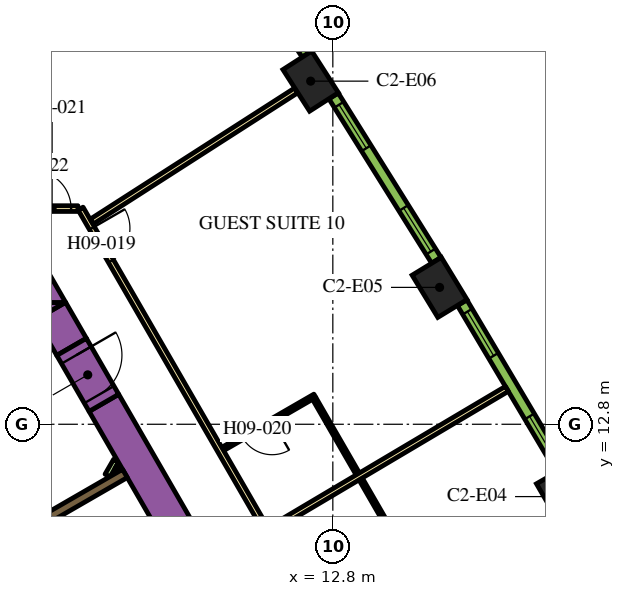
"""IFC4 building model, lengths in metres.
Left out: names, types, materials, properties, quantities, classifications, styles, units other than length and angle.
Written with IfcOpenShell. Run it as: python <this file> out.ifc"""

import sys

from ifc_helpers import new_model, si_unit, direction, frame, frame_2d, origin, origin_2d, place, context, subcontext, project, spatial, polyline, rectangle, outline, extrude, element, fill, save


model = new_model("IFC4")
c1 = context("Model", 3, precision=1e-05, world=origin(), true_north=direction((0.0, 1.0)))
c2 = subcontext(c1, "Body", "Model", "MODEL_VIEW")
j1 = project(units=[si_unit("LENGTHUNIT", "METRE"), si_unit("PLANEANGLEUNIT", "RADIAN")], contexts=[c1])
p1 = place(None, origin())
s1 = spatial("IfcSite", under=j1, at=p1, CompositionType="ELEMENT")
p2 = place(p1, origin())
s2 = spatial("IfcBuilding", under=s1, at=p2, CompositionType="ELEMENT")
p3 = place(p2, frame((0.0, 0.0, 126.6)))
s3 = spatial("IfcBuildingStorey", under=s2, at=p3, CompositionType="ELEMENT", Elevation=126.6)
for number, where, z_axis, x_axis in (
    (1, (18.874, 10.897, 0.0), (0.0, 0.0, 1.0), (-0.5, 0.866, 0.0)),
    (2, (15.609, 16.402, 0.0), (0.0, 0.0, 1.0), (-0.52, 0.854, 0.0)),
    (3, (12.217, 21.828, 0.0), (0.0, 0.0, 1.0), (-0.54, 0.842, 0.0)),
):
    element("IfcColumn", number, at=place(p3, frame(where, z_axis=z_axis, x_axis=x_axis)), inside=s3, PredefinedType="COLUMN", context=c2, shape_type="SweptSolid", body=[
        extrude(rectangle(XDim=1.3, YDim=0.9, at=origin_2d()), origin(), (0.0, 0.0, 1.0), 3.9),
    ])
p4 = place(p3, frame((6.776, 13.364, 0.0), z_axis=(0.0, 0.0, 1.0), x_axis=(0.500004177138, -0.8660229921, 0.0)))
e4 = element("IfcWall", 4, at=p4, inside=s3, PredefinedType="SOLIDWALL", context=c2, shape_type="SweptSolid", body=[
    extrude(rectangle(XDim=20.204, YDim=0.9, at=frame_2d((10.102, 0.0))), origin(), (0.0, 0.0, 1.0), 3.9),
])
p5 = place(p3, origin())
e5 = element("IfcWall", 5, at=p5, inside=s3, PredefinedType="SOLIDWALL", context=c2, shape_type="SweptSolid", body=[
    extrude(outline(polyline([(5.265, 16.0), (5.265, 16.88), (5.773, 16.0), (5.265, 16.0)])), origin(), (0.0, 0.0, 1.0), 3.9),
])
p6 = place(p3, frame((5.926, 14.836, 0.0), z_axis=(0.0, 0.0, 1.0), x_axis=(-0.500076735116, 0.865981096212, 0.0)))
e6 = element("IfcWall", 6, at=p6, inside=s3, PredefinedType="SOLIDWALL", context=c2, shape_type="SweptSolid", body=[
    extrude(rectangle(XDim=1.094, YDim=0.9, at=frame_2d((0.547, 0.0))), origin(), (0.0, 0.0, 1.0), 3.9),
])
e7 = element("IfcWall", 7, at=p5, inside=s3, PredefinedType="SOLIDWALL", context=c2, shape_type="SweptSolid", body=[
    extrude(outline(polyline([(4.734, 16.0), (5.75, 16.0), (4.988, 15.56), (4.734, 16.0)])), origin(), (0.0, 0.0, 1.0), 3.9),
])
p7 = place(p3, frame((5.356, 10.367, 0.0), z_axis=(0.0, 0.0, 1.0), x_axis=(0.865978535641, 0.50008116922, 0.0)))
e8 = element("IfcWall", 8, at=p7, inside=s3, PredefinedType="SOLIDWALL", context=c2, shape_type="SweptSolid", body=[
    extrude(rectangle(XDim=2.278, YDim=0.25, at=frame_2d((1.139, 0.0))), origin(), (0.0, 0.0, 1.0), 3.9),
])
p8 = place(p3, frame((6.872, 11.45, 0.0), z_axis=(0.0, 0.0, 1.0), x_axis=(0.499846793097, 0.866113839764, 0.0)))
e9 = element("IfcWall", 9, at=p8, inside=s3, PredefinedType="PARTITIONING", context=c2, shape_type="SweptSolid", body=[
    extrude(rectangle(XDim=0.453, YDim=0.15, at=frame_2d((0.227, 0.0))), origin(), (0.0, 0.0, 1.0), 2.75),
])
p9 = place(p3, frame((7.131, 11.6, 0.0), z_axis=(0.0, 0.0, 1.0), x_axis=(0.498600033135, 0.866832167699, 0.0)))
e10 = element("IfcWall", 10, at=p9, inside=s3, PredefinedType="PARTITIONING", context=c2, shape_type="SweptSolid", body=[
    extrude(rectangle(XDim=0.107, YDim=0.15, at=frame_2d((0.053, 0.0))), origin(), (0.0, 0.0, 1.0), 2.75),
])
p10 = place(p3, frame((5.926, 14.836, 0.0), z_axis=(0.0, 0.0, 1.0), x_axis=(0.500062241894, -0.865989465428, 0.0)))
e11 = element("IfcWall", 11, at=p10, inside=s3, PredefinedType="SOLIDWALL", context=c2, shape_type="SweptSolid", body=[
    extrude(rectangle(XDim=1.7, YDim=0.9, at=frame_2d((0.85, 0.0))), origin(), (0.0, 0.0, 1.0), 3.9),
])
p11 = place(p10, frame((0.25, 0.0, 0.0)))
e12 = element("IfcOpeningElement", 12, at=p11, cuts=e11, PredefinedType="OPENING", context=c2, shape_type="SweptSolid", body=[
    extrude(rectangle(XDim=1.2, YDim=2.1, at=frame_2d((0.6, 1.05))), frame((0.0, 0.46, 0.0), z_axis=(0.0, -1.0, 0.0), x_axis=(1.0, 0.0, 0.0)), (0.0, 0.0, 1.0), 0.92),
])
p12 = place(p3, frame((6.163, 18.475, 0.0), z_axis=(0.0, 0.0, 1.0), x_axis=(0.500001317485, -0.866024643133, 0.0)))
e13 = element("IfcWall", 13, at=p12, inside=s3, PredefinedType="PARTITIONING", context=c2, shape_type="SweptSolid", body=[
    extrude(rectangle(XDim=25.767, YDim=0.15, at=frame_2d((12.883, 0.0))), origin(), (0.0, 0.0, 1.0), 2.75),
])
p13 = place(p12, frame((19.306, 0.0, 0.0)))
e14 = element("IfcOpeningElement", 14, at=p13, cuts=e13, PredefinedType="OPENING", context=c2, shape_type="SweptSolid", body=[
    extrude(rectangle(XDim=1.0, YDim=2.1, at=frame_2d((0.5, 1.05))), frame((0.0, 0.085, 0.0), z_axis=(0.0, -1.0, 0.0), x_axis=(1.0, 0.0, 0.0)), (0.0, 0.0, 1.0), 0.17),
])
p14 = place(p12, frame((17.999, 0.0, 0.0)))
e15 = element("IfcOpeningElement", 15, at=p14, cuts=e13, PredefinedType="OPENING", context=c2, shape_type="SweptSolid", body=[
    extrude(rectangle(XDim=1.0, YDim=2.1, at=frame_2d((0.5, 1.05))), frame((0.0, 0.085, 0.0), z_axis=(0.0, -1.0, 0.0), x_axis=(1.0, 0.0, 0.0)), (0.0, 0.0, 1.0), 0.17),
])
p15 = place(p12, frame((0.596, 0.0, 0.0)))
e16 = element("IfcOpeningElement", 16, at=p15, cuts=e13, PredefinedType="OPENING", context=c2, shape_type="SweptSolid", body=[
    extrude(rectangle(XDim=1.0, YDim=2.1, at=frame_2d((0.5, 1.05))), frame((0.0, 0.085, 0.0), z_axis=(0.0, -1.0, 0.0), x_axis=(1.0, 0.0, 0.0)), (0.0, 0.0, 1.0), 0.17),
])
p16 = place(p3, frame((0.825, 18.475, 0.0), z_axis=(0.0, 0.0, 1.0), x_axis=(1.0, 0.0, 0.0)))
e17 = element("IfcWall", 17, at=p16, inside=s3, PredefinedType="PARTITIONING", context=c2, shape_type="SweptSolid", body=[
    extrude(rectangle(XDim=5.268, YDim=0.15, at=frame_2d((2.634, 0.0))), origin(), (0.0, 0.0, 1.0), 2.75),
])
p17 = place(p16, frame((4.088, 0.0, 0.0)))
e18 = element("IfcOpeningElement", 18, at=p17, cuts=e17, PredefinedType="OPENING", context=c2, shape_type="SweptSolid", body=[
    extrude(rectangle(XDim=1.0, YDim=2.1, at=frame_2d((0.5, 1.05))), frame((0.0, 0.085, 0.0), z_axis=(0.0, -1.0, 0.0), x_axis=(1.0, 0.0, 0.0)), (0.0, 0.0, 1.0), 0.17),
])
p18 = place(p3, frame((8.326, 26.923, 0.0), z_axis=(0.0, 0.0, 1.0), x_axis=(-0.828836601893, -0.5594907393, 0.0)))
e19 = element("IfcWall", 19, at=p18, inside=s3, PredefinedType="PARTITIONING", context=c2, shape_type="SweptSolid", body=[
    extrude(rectangle(XDim=8.909, YDim=0.15, at=frame_2d((4.455, 0.0))), origin(), (0.0, 0.0, 1.0), 2.75),
])
p19 = place(p3, frame((11.838, 21.585, 0.0), z_axis=(0.0, 0.0, 1.0), x_axis=(-0.841699322813, -0.539946525108, 0.0)))
e20 = element("IfcWall", 20, at=p19, inside=s3, PredefinedType="PARTITIONING", context=c2, shape_type="SweptSolid", body=[
    extrude(rectangle(XDim=6.392, YDim=0.15, at=frame_2d((3.196, 0.0))), origin(), (0.0, 0.0, 1.0), 2.75),
])
p20 = place(p3, frame((17.379, 13.731, 0.0), z_axis=(0.0, 0.0, 1.0), x_axis=(-0.860132461691, -0.510070728768, 0.0)))
e21 = element("IfcWall", 21, at=p20, inside=s3, PredefinedType="PARTITIONING", context=c2, shape_type="SweptSolid", body=[
    extrude(rectangle(XDim=7.257, YDim=0.15, at=frame_2d((3.628, 0.0))), origin(), (0.0, 0.0, 1.0), 2.75),
])
p21 = place(p3, frame((14.712, 9.318, 0.0), z_axis=(0.0, 0.0, 1.0), x_axis=(-0.50000006957, 0.866025363618, 0.0)))
e22 = element("IfcWall", 22, at=p21, inside=s3, PredefinedType="PARTITIONING", context=c2, shape_type="SweptSolid", body=[
    extrude(rectangle(XDim=2.36, YDim=0.1, at=frame_2d((1.18, 0.0))), origin(), (0.0, 0.0, 1.0), 2.75),
])
p22 = place(p3, frame((12.327, 13.549, 0.0), z_axis=(0.0, 0.0, 1.0), x_axis=(-0.866056369097, -0.49994636267, 0.0)))
e23 = element("IfcWall", 23, at=p22, inside=s3, PredefinedType="PARTITIONING", context=c2, shape_type="SweptSolid", body=[
    extrude(rectangle(XDim=2.8, YDim=0.1, at=frame_2d((1.4, 0.0))), origin(), (0.0, 0.0, 1.0), 2.75),
])
p23 = place(p22, frame((1.3, 0.0, 0.0)))
e24 = element("IfcOpeningElement", 24, at=p23, cuts=e23, PredefinedType="OPENING", context=c2, shape_type="SweptSolid", body=[
    extrude(rectangle(XDim=0.9, YDim=2.1, at=frame_2d((0.45, 1.05))), frame((0.0, 0.06, 0.0), z_axis=(0.0, -1.0, 0.0), x_axis=(1.0, 0.0, 0.0)), (0.0, 0.0, 1.0), 0.12),
])
p24 = place(p3, frame((12.309, 13.481, 0.0), z_axis=(0.0, 0.0, 1.0), x_axis=(0.499968531483, -0.866043571379, 0.0)))
e25 = element("IfcWall", 25, at=p24, inside=s3, PredefinedType="PARTITIONING", context=c2, shape_type="SweptSolid", body=[
    extrude(rectangle(XDim=2.29, YDim=0.1, at=frame_2d((1.145, 0.0))), origin(), (0.0, 0.0, 1.0), 2.75),
])
p25 = place(p3, frame((18.805, 11.611, 0.0), z_axis=(0.0, 0.0, 1.0), x_axis=(-0.510054281659, 0.860142214847, 0.0)))
e26 = element("IfcWall", 26, at=p25, inside=s3, PredefinedType="SOLIDWALL", context=c2, shape_type="SweptSolid", body=[
    extrude(rectangle(XDim=5.101, YDim=0.29, at=frame_2d((2.55, 0.0))), origin(), (0.0, 0.0, 1.0), 3.65),
])
p26 = place(p25, frame((0.273, 0.0, 0.9)))
e27 = element("IfcOpeningElement", 27, at=p26, cuts=e26, PredefinedType="OPENING", context=c2, shape_type="SweptSolid", body=[
    extrude(rectangle(XDim=1.35, YDim=2.15, at=frame_2d((0.675, 1.075))), frame((0.0, 0.155, 0.0), z_axis=(0.0, -1.0, 0.0), x_axis=(1.0, 0.0, 0.0)), (0.0, 0.0, 1.0), 0.31),
])
p27 = place(p25, frame((3.478, 0.0, 0.9)))
e28 = element("IfcOpeningElement", 28, at=p27, cuts=e26, PredefinedType="OPENING", context=c2, shape_type="SweptSolid", body=[
    extrude(rectangle(XDim=1.35, YDim=2.15, at=frame_2d((0.675, 1.075))), frame((0.0, 0.155, 0.0), z_axis=(0.0, -1.0, 0.0), x_axis=(1.0, 0.0, 0.0)), (0.0, 0.0, 1.0), 0.31),
])
p28 = place(p3, frame((15.524, 17.114, 0.0), z_axis=(0.0, 0.0, 1.0), x_axis=(-0.530072082134, 0.847952585787, 0.0)))
e29 = element("IfcWall", 29, at=p28, inside=s3, PredefinedType="SOLIDWALL", context=c2, shape_type="SweptSolid", body=[
    extrude(rectangle(XDim=5.1, YDim=0.29, at=frame_2d((2.55, 0.0))), origin(), (0.0, 0.0, 1.0), 3.65),
])
p29 = place(p28, frame((0.273, 0.0, 0.9)))
e30 = element("IfcOpeningElement", 30, at=p29, cuts=e29, PredefinedType="OPENING", context=c2, shape_type="SweptSolid", body=[
    extrude(rectangle(XDim=1.35, YDim=2.15, at=frame_2d((0.675, 1.075))), frame((0.0, 0.155, 0.0), z_axis=(0.0, -1.0, 0.0), x_axis=(1.0, 0.0, 0.0)), (0.0, 0.0, 1.0), 0.31),
])
p30 = place(p28, frame((3.478, 0.0, 0.9)))
e31 = element("IfcOpeningElement", 31, at=p30, cuts=e29, PredefinedType="OPENING", context=c2, shape_type="SweptSolid", body=[
    extrude(rectangle(XDim=1.35, YDim=2.15, at=frame_2d((0.675, 1.075))), frame((0.0, 0.155, 0.0), z_axis=(0.0, -1.0, 0.0), x_axis=(1.0, 0.0, 0.0)), (0.0, 0.0, 1.0), 0.31),
])
p31 = place(p3, frame((12.115, 22.539, 0.0), z_axis=(0.0, 0.0, 1.0), x_axis=(-0.549741341923, 0.835334937005, 0.0)))
e32 = element("IfcWall", 32, at=p31, inside=s3, PredefinedType="SOLIDWALL", context=c2, shape_type="SweptSolid", body=[
    extrude(rectangle(XDim=5.1, YDim=0.29, at=frame_2d((2.55, 0.0))), origin(), (0.0, 0.0, 1.0), 3.65),
])
p32 = place(p31, frame((0.273, 0.0, 0.9)))
e33 = element("IfcOpeningElement", 33, at=p32, cuts=e32, PredefinedType="OPENING", context=c2, shape_type="SweptSolid", body=[
    extrude(rectangle(XDim=1.35, YDim=2.15, at=frame_2d((0.675, 1.075))), frame((0.0, 0.155, 0.0), z_axis=(0.0, -1.0, 0.0), x_axis=(1.0, 0.0, 0.0)), (0.0, 0.0, 1.0), 0.31),
])
p33 = place(p31, frame((3.478, 0.0, 0.9)))
e34 = element("IfcOpeningElement", 34, at=p33, cuts=e32, PredefinedType="OPENING", context=c2, shape_type="SweptSolid", body=[
    extrude(rectangle(XDim=1.35, YDim=2.15, at=frame_2d((0.675, 1.075))), frame((0.0, 0.155, 0.0), z_axis=(0.0, -1.0, 0.0), x_axis=(1.0, 0.0, 0.0)), (0.0, 0.0, 1.0), 0.31),
])
p34 = place(p11, origin())
e35 = element("IfcDoor", 35, at=p34, inside=s3, OperationType="SINGLE_SWING_LEFT", PredefinedType="DOOR", context=c2, shape_type="SweptSolid", body=[
    extrude(rectangle(XDim=1.2, YDim=2.1, at=frame_2d((0.6, 1.05))), frame((0.0, 0.025, 0.0), z_axis=(0.0, -1.0, 0.0), x_axis=(1.0, 0.0, 0.0)), (0.0, 0.0, 1.0), 0.05),
])
fill(e12, e35)
p35 = place(p15, origin())
e36 = element("IfcDoor", 36, at=p35, inside=s3, OperationType="SINGLE_SWING_LEFT", PredefinedType="DOOR", context=c2, shape_type="SweptSolid", body=[
    extrude(rectangle(XDim=1.0, YDim=2.1, at=frame_2d((0.5, 1.05))), frame((0.0, 0.025, 0.0), z_axis=(0.0, -1.0, 0.0), x_axis=(1.0, 0.0, 0.0)), (0.0, 0.0, 1.0), 0.05),
])
fill(e16, e36)
p36 = place(p23, origin())
e37 = element("IfcDoor", 37, at=p36, inside=s3, OperationType="SINGLE_SWING_LEFT", PredefinedType="DOOR", context=c2, shape_type="SweptSolid", body=[
    extrude(rectangle(XDim=0.9, YDim=2.1, at=frame_2d((0.45, 1.05))), frame((0.0, 0.025, 0.0), z_axis=(0.0, -1.0, 0.0), x_axis=(1.0, 0.0, 0.0)), (0.0, 0.0, 1.0), 0.05),
])
fill(e24, e37)
p37 = place(p17, origin())
e38 = element("IfcDoor", 38, at=p37, inside=s3, OperationType="SINGLE_SWING_RIGHT", PredefinedType="DOOR", context=c2, shape_type="SweptSolid", body=[
    extrude(rectangle(XDim=1.0, YDim=2.1, at=frame_2d((0.5, 1.05))), frame((0.0, 0.025, 0.0), z_axis=(0.0, -1.0, 0.0), x_axis=(1.0, 0.0, 0.0)), (0.0, 0.0, 1.0), 0.05),
])
fill(e18, e38)
p38 = place(p26, origin())
e39 = element("IfcWindow", 39, at=p38, inside=s3, PartitioningType="DOUBLE_PANEL_VERTICAL", PredefinedType="WINDOW", context=c2, shape_type="SweptSolid", body=[
    extrude(rectangle(XDim=1.35, YDim=2.15, at=frame_2d((0.675, 1.075))), frame((0.0, 0.015, 0.0), z_axis=(0.0, -1.0, 0.0), x_axis=(1.0, 0.0, 0.0)), (0.0, 0.0, 1.0), 0.06),
])
fill(e27, e39)
p39 = place(p27, origin())
e40 = element("IfcWindow", 40, at=p39, inside=s3, PartitioningType="DOUBLE_PANEL_VERTICAL", PredefinedType="WINDOW", context=c2, shape_type="SweptSolid", body=[
    extrude(rectangle(XDim=1.35, YDim=2.15, at=frame_2d((0.675, 1.075))), frame((0.0, 0.015, 0.0), z_axis=(0.0, -1.0, 0.0), x_axis=(1.0, 0.0, 0.0)), (0.0, 0.0, 1.0), 0.06),
])
fill(e28, e40)
p40 = place(p29, origin())
e41 = element("IfcWindow", 41, at=p40, inside=s3, PartitioningType="DOUBLE_PANEL_VERTICAL", PredefinedType="WINDOW", context=c2, shape_type="SweptSolid", body=[
    extrude(rectangle(XDim=1.35, YDim=2.15, at=frame_2d((0.675, 1.075))), frame((0.0, 0.015, 0.0), z_axis=(0.0, -1.0, 0.0), x_axis=(1.0, 0.0, 0.0)), (0.0, 0.0, 1.0), 0.06),
])
fill(e30, e41)
p41 = place(p30, origin())
e42 = element("IfcWindow", 42, at=p41, inside=s3, PartitioningType="DOUBLE_PANEL_VERTICAL", PredefinedType="WINDOW", context=c2, shape_type="SweptSolid", body=[
    extrude(rectangle(XDim=1.35, YDim=2.15, at=frame_2d((0.675, 1.075))), frame((0.0, 0.015, 0.0), z_axis=(0.0, -1.0, 0.0), x_axis=(1.0, 0.0, 0.0)), (0.0, 0.0, 1.0), 0.06),
])
fill(e31, e42)
save(model, sys.argv[1])
